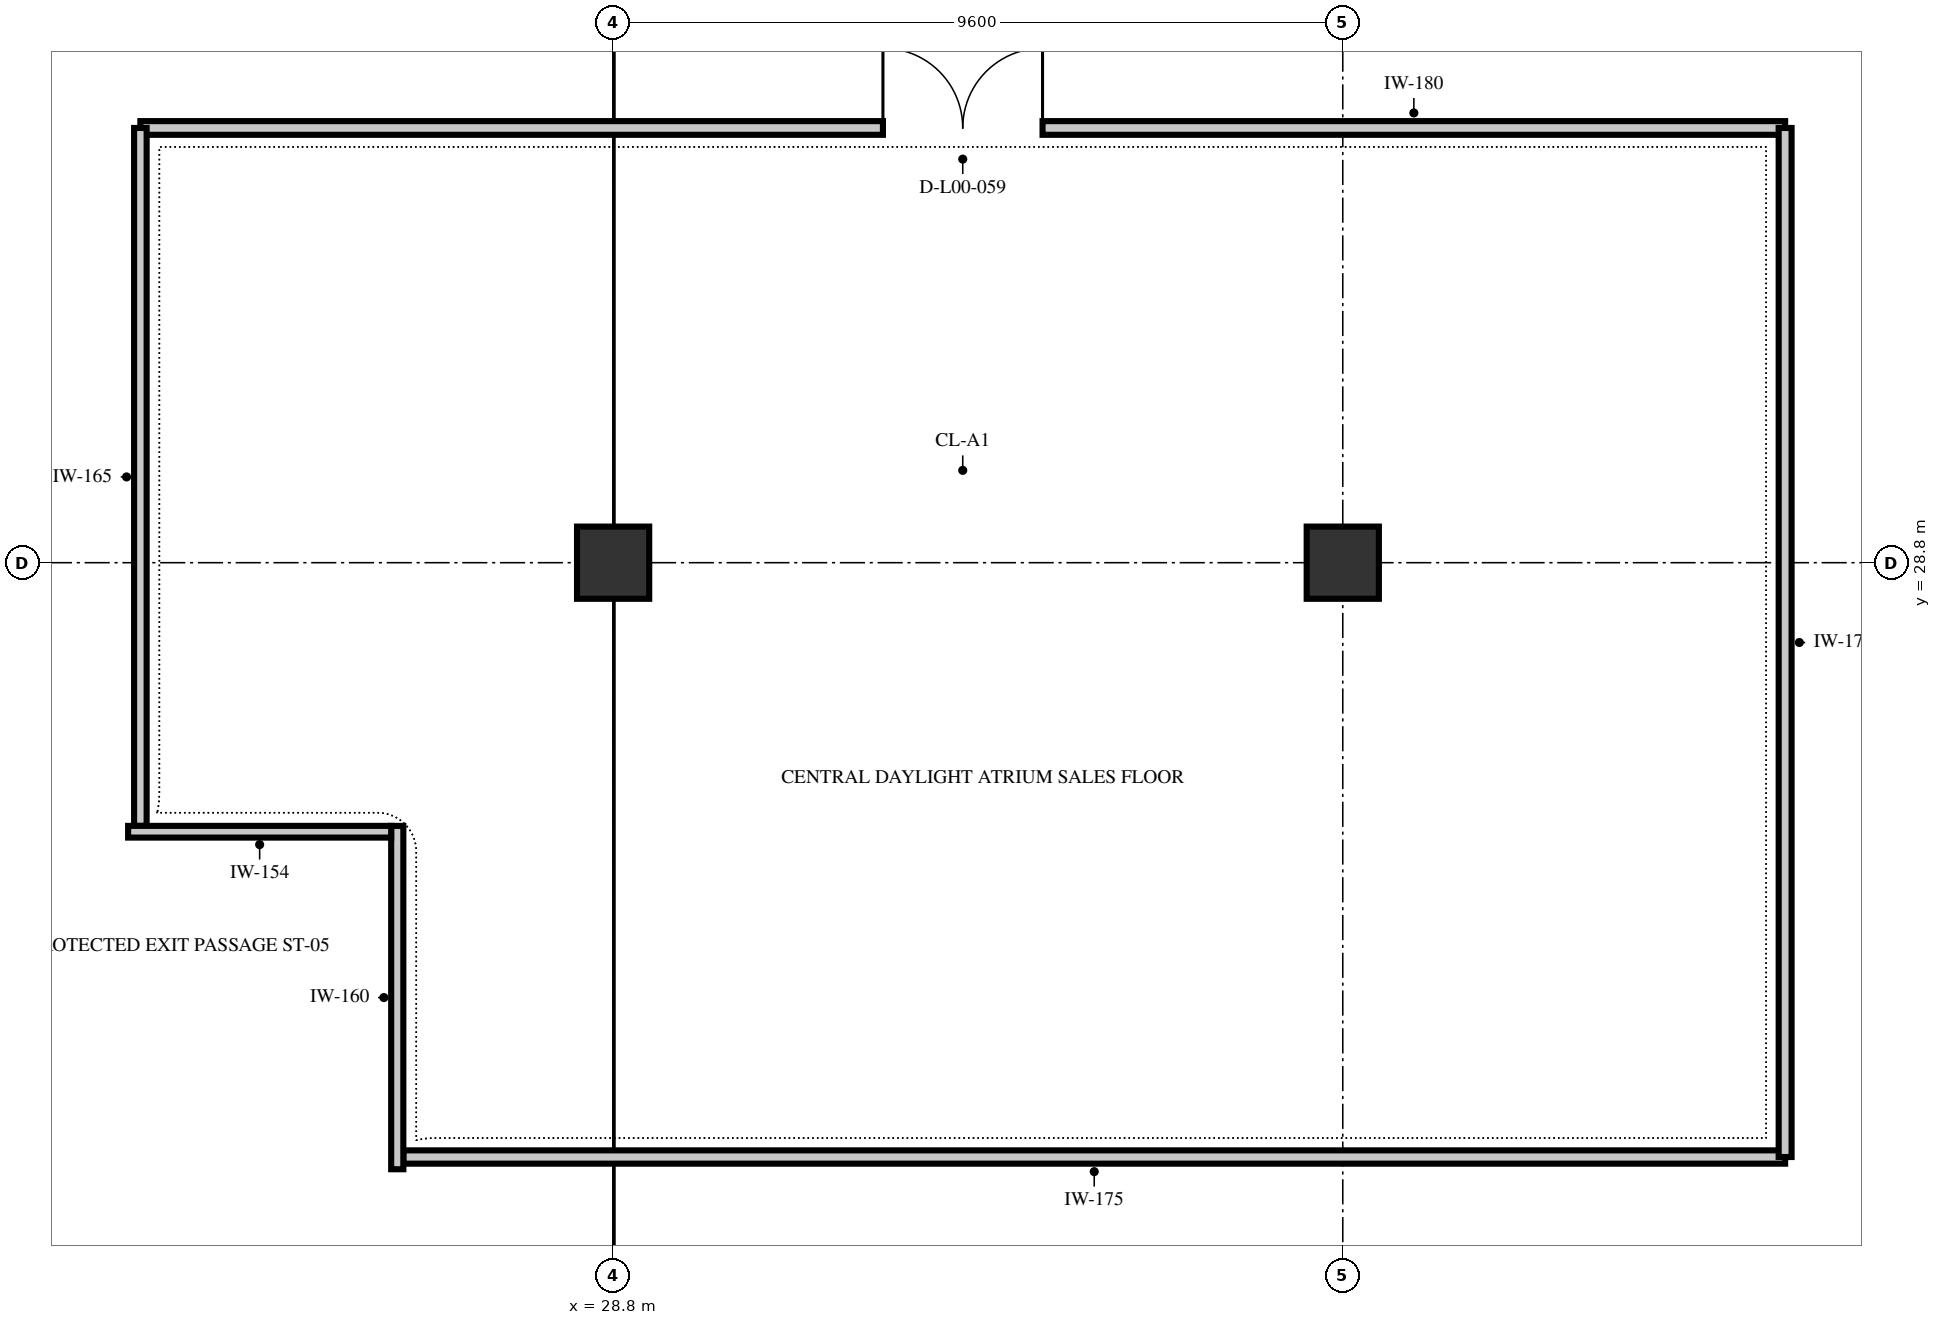
"""IFC4 building model, lengths in metres.
Left out: names, types, materials, properties, quantities, classifications, styles, units other than length and angle.
Written with IfcOpenShell. Run it as: python <this file> out.ifc"""

import sys

from ifc_helpers import new_model, si_unit, direction, frame, frame_2d, origin, origin_2d, place, context, subcontext, project, spatial, rectangle, extrude, element, fill, save


model = new_model("IFC4")
c1 = context("Model", 3, precision=1e-05, world=origin(), true_north=direction((0.0, 1.0)))
c2 = subcontext(c1, "Body", "Model", "MODEL_VIEW")
j1 = project(units=[si_unit("LENGTHUNIT", "METRE"), si_unit("PLANEANGLEUNIT", "RADIAN")], contexts=[c1])
p1 = place(None, origin())
s1 = spatial("IfcSite", under=j1, at=p1, CompositionType="ELEMENT")
p2 = place(p1, origin())
s2 = spatial("IfcBuilding", under=s1, at=p2, CompositionType="ELEMENT")
p3 = place(p2, origin())
s3 = spatial("IfcBuildingStorey", under=s2, at=p3, CompositionType="ELEMENT", Elevation=0.0)
for number, where, z_axis, x_axis in (
    (1, (28.8, 28.8, 0.0), (0.0, 0.0, 1.0), (1.0, 0.0, 0.0)),
    (2, (38.4, 28.8, 0.0), (0.0, 0.0, 1.0), (1.0, 0.0, 0.0)),
):
    element("IfcColumn", number, at=place(p3, frame(where, z_axis=z_axis, x_axis=x_axis)), inside=s3, PredefinedType="COLUMN", context=c2, shape_type="SweptSolid", body=[
        extrude(rectangle(XDim=0.95, YDim=0.95, at=origin_2d()), origin(), (0.0, 0.0, 1.0), 5.4),
    ])
p4 = place(p3, frame((22.58, 34.52, 0.0), z_axis=(0.0, 0.0, 1.0), x_axis=(1.0, 0.0, 0.0)))
e3 = element("IfcWall", 3, at=p4, inside=s3, PredefinedType="PARTITIONING", context=c2, shape_type="SweptSolid", body=[
    extrude(rectangle(XDim=21.64, YDim=0.18, at=frame_2d((10.82, 0.0))), origin(), (0.0, 0.0, 1.0), 5.09),
])
p5 = place(p4, frame((9.77, 0.0, 0.0)))
e4 = element("IfcOpeningElement", 4, at=p5, cuts=e3, PredefinedType="OPENING", context=c2, shape_type="SweptSolid", body=[
    extrude(rectangle(XDim=2.1, YDim=2.42, at=frame_2d((1.05, 1.21))), frame((0.0, 0.102, 0.0), z_axis=(0.0, -1.0, 0.0), x_axis=(1.0, 0.0, 0.0)), (0.0, 0.0, 1.0), 0.204),
])
p6 = place(p3, frame((44.22, 20.98, 0.0), z_axis=(0.0, 0.0, 1.0), x_axis=(-1.0, 0.0, 0.0)))
e5 = element("IfcWall", 5, at=p6, inside=s3, PredefinedType="PARTITIONING", context=c2, shape_type="SweptSolid", body=[
    extrude(rectangle(XDim=18.18, YDim=0.175, at=frame_2d((9.09, 0.0))), origin(), (0.0, 0.0, 1.0), 5.09),
])
p7 = place(p3, frame((44.22, 34.52, 0.0), z_axis=(0.0, 0.0, 1.0), x_axis=(0.0, -1.0, 0.0)))
e6 = element("IfcWall", 6, at=p7, inside=s3, PredefinedType="PARTITIONING", context=c2, shape_type="SweptSolid", body=[
    extrude(rectangle(XDim=13.54, YDim=0.17, at=frame_2d((6.77, 0.0))), origin(), (0.0, 0.0, 1.0), 5.09),
])
p8 = place(p3, frame((22.58, 25.337, 0.0), z_axis=(0.0, 0.0, 1.0), x_axis=(0.0, 1.0, 0.0)))
e7 = element("IfcWall", 7, at=p8, inside=s3, PredefinedType="PARTITIONING", context=c2, shape_type="SweptSolid", body=[
    extrude(rectangle(XDim=9.183, YDim=0.165, at=frame_2d((4.592, 0.0))), origin(), (0.0, 0.0, 1.0), 5.09),
])
p9 = place(p3, frame((25.96, 20.819, 0.0), z_axis=(0.0, 0.0, 1.0), x_axis=(0.0, 1.0, 0.0)))
e8 = element("IfcWall", 8, at=p9, inside=s3, PredefinedType="PARTITIONING", context=c2, shape_type="SweptSolid", body=[
    extrude(rectangle(XDim=4.518, YDim=0.16, at=frame_2d((2.259, 0.0))), origin(), (0.0, 0.0, 1.0), 5.09),
])
p10 = place(p3, frame((25.88, 25.26, 0.0), z_axis=(0.0, 0.0, 1.0), x_axis=(-1.0, 0.0, 0.0)))
e9 = element("IfcWall", 9, at=p10, inside=s3, PredefinedType="PARTITIONING", context=c2, shape_type="SweptSolid", body=[
    extrude(rectangle(XDim=3.461, YDim=0.154, at=frame_2d((1.73, 0.0))), origin(), (0.0, 0.0, 1.0), 5.09),
])
p11 = place(p5, origin())
e10 = element("IfcDoor", 10, at=p11, inside=s3, OperationType="DOUBLE_DOOR_SINGLE_SWING", PredefinedType="DOOR", context=c2, shape_type="SweptSolid", body=[
    extrude(rectangle(XDim=2.1, YDim=2.42, at=frame_2d((1.05, 1.21))), frame((0.0, 0.025, 0.0), z_axis=(0.0, -1.0, 0.0), x_axis=(1.0, 0.0, 0.0)), (0.0, 0.0, 1.0), 0.05),
])
fill(e4, e10)
save(model, sys.argv[1])
